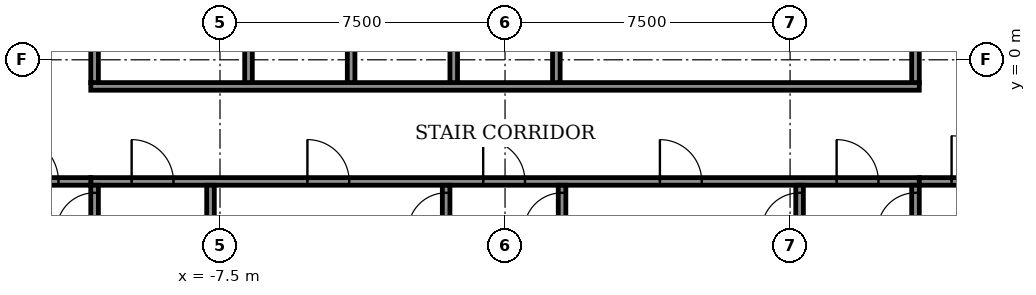
"""IFC4 building model, lengths in metres.
Left out: names, types, materials, properties, quantities, classifications, styles, units other than length and angle.
Written with IfcOpenShell. Run it as: python <this file> out.ifc"""

import sys

from ifc_helpers import new_model, si_unit, direction, frame, frame_2d, origin, place, context, subcontext, project, spatial, rectangle, extrude, element, fill, save


model = new_model("IFC4")
c1 = context("Model", 3, precision=1e-05, world=origin(), true_north=direction((0.0, 1.0)))
c2 = subcontext(c1, "Body", "Model", "MODEL_VIEW")
j1 = project(units=[si_unit("LENGTHUNIT", "METRE"), si_unit("PLANEANGLEUNIT", "RADIAN")], contexts=[c1])
p1 = place(None, origin())
s1 = spatial("IfcSite", under=j1, at=p1, CompositionType="ELEMENT")
p2 = place(p1, origin())
s2 = spatial("IfcBuilding", under=s1, at=p2, CompositionType="ELEMENT")
p3 = place(p2, frame((0.0, 0.0, 324.1)))
s3 = spatial("IfcBuildingStorey", under=s2, at=p3, CompositionType="ELEMENT", Elevation=324.1)
p4 = place(p3, frame((-10.9, -3.2, 0.0), z_axis=(0.0, 0.0, 1.0), x_axis=(1.0, 0.0, 0.0)))
e1 = element("IfcWall", 1, at=p4, inside=s3, PredefinedType="SHEAR", context=c2, shape_type="SweptSolid", body=[
    extrude(rectangle(XDim=21.8, YDim=0.2, at=frame_2d((10.9, 0.0))), origin(), (0.0, 0.0, 1.0), 5.05),
])
p5 = place(p4, frame((1.075, 0.0, 0.0)))
e2 = element("IfcOpeningElement", 2, at=p5, cuts=e1, PredefinedType="OPENING", context=c2, shape_type="SweptSolid", body=[
    extrude(rectangle(XDim=1.1, YDim=2.1, at=frame_2d((0.55, 1.05))), frame((0.0, 0.11, 0.0), z_axis=(0.0, -1.0, 0.0), x_axis=(1.0, 0.0, 0.0)), (0.0, 0.0, 1.0), 0.22),
])
p6 = place(p4, frame((10.325, 0.0, 0.0)))
e3 = element("IfcOpeningElement", 3, at=p6, cuts=e1, PredefinedType="OPENING", context=c2, shape_type="SweptSolid", body=[
    extrude(rectangle(XDim=1.1, YDim=2.1, at=frame_2d((0.55, 1.05))), frame((0.0, 0.11, 0.0), z_axis=(0.0, -1.0, 0.0), x_axis=(1.0, 0.0, 0.0)), (0.0, 0.0, 1.0), 0.22),
])
p7 = place(p4, frame((19.625, 0.0, 0.0)))
e4 = element("IfcOpeningElement", 4, at=p7, cuts=e1, PredefinedType="OPENING", context=c2, shape_type="SweptSolid", body=[
    extrude(rectangle(XDim=1.1, YDim=2.1, at=frame_2d((0.55, 1.05))), frame((0.0, 0.11, 0.0), z_axis=(0.0, -1.0, 0.0), x_axis=(1.0, 0.0, 0.0)), (0.0, 0.0, 1.0), 0.22),
])
p8 = place(p4, frame((5.7, 0.0, 0.0)))
e5 = element("IfcOpeningElement", 5, at=p8, cuts=e1, PredefinedType="OPENING", context=c2, shape_type="SweptSolid", body=[
    extrude(rectangle(XDim=1.1, YDim=2.1, at=frame_2d((0.55, 1.05))), frame((0.0, 0.11, 0.0), z_axis=(0.0, -1.0, 0.0), x_axis=(1.0, 0.0, 0.0)), (0.0, 0.0, 1.0), 0.22),
])
p9 = place(p4, frame((14.975, 0.0, 0.0)))
e6 = element("IfcOpeningElement", 6, at=p9, cuts=e1, PredefinedType="OPENING", context=c2, shape_type="SweptSolid", body=[
    extrude(rectangle(XDim=1.1, YDim=2.1, at=frame_2d((0.55, 1.05))), frame((0.0, 0.11, 0.0), z_axis=(0.0, -1.0, 0.0), x_axis=(1.0, 0.0, 0.0)), (0.0, 0.0, 1.0), 0.22),
])
p10 = place(p3, frame((-10.9, -0.7, 0.0), z_axis=(0.0, 0.0, 1.0), x_axis=(1.0, 0.0, 0.0)))
e7 = element("IfcWall", 7, at=p10, inside=s3, PredefinedType="SHEAR", context=c2, shape_type="SweptSolid", body=[
    extrude(rectangle(XDim=21.8, YDim=0.2, at=frame_2d((10.9, 0.0))), origin(), (0.0, 0.0, 1.0), 5.05),
])
p11 = place(p3, frame((-10.8, -10.8, 0.0), z_axis=(0.0, 0.0, 1.0), x_axis=(0.0, 1.0, 0.0)))
e8 = element("IfcWall", 8, at=p11, inside=s3, PredefinedType="SHEAR", context=c2, shape_type="SweptSolid", body=[
    extrude(rectangle(XDim=7.5, YDim=0.2, at=frame_2d((3.75, 0.0))), origin(), (0.0, 0.0, 1.0), 5.05),
])
p12 = place(p11, frame((6.3, 0.0, 0.0)))
e9 = element("IfcOpeningElement", 9, at=p12, cuts=e8, PredefinedType="OPENING", context=c2, shape_type="SweptSolid", body=[
    extrude(rectangle(XDim=1.0, YDim=2.1, at=frame_2d((0.5, 1.05))), frame((0.0, 0.11, 0.0), z_axis=(0.0, -1.0, 0.0), x_axis=(1.0, 0.0, 0.0)), (0.0, 0.0, 1.0), 0.22),
])
p13 = place(p3, frame((-7.75, -10.8, 0.0), z_axis=(0.0, 0.0, 1.0), x_axis=(0.0, 1.0, 0.0)))
e10 = element("IfcWall", 10, at=p13, inside=s3, PredefinedType="SHEAR", context=c2, shape_type="SweptSolid", body=[
    extrude(rectangle(XDim=7.5, YDim=0.2, at=frame_2d((3.75, 0.0))), origin(), (0.0, 0.0, 1.0), 5.05),
])
p14 = place(p3, frame((-1.55, -10.8, 0.0), z_axis=(0.0, 0.0, 1.0), x_axis=(0.0, 1.0, 0.0)))
e11 = element("IfcWall", 11, at=p14, inside=s3, PredefinedType="SHEAR", context=c2, shape_type="SweptSolid", body=[
    extrude(rectangle(XDim=7.5, YDim=0.2, at=frame_2d((3.75, 0.0))), origin(), (0.0, 0.0, 1.0), 5.05),
])
p15 = place(p14, frame((6.3, 0.0, 0.0)))
e12 = element("IfcOpeningElement", 12, at=p15, cuts=e11, PredefinedType="OPENING", context=c2, shape_type="SweptSolid", body=[
    extrude(rectangle(XDim=1.0, YDim=2.1, at=frame_2d((0.5, 1.05))), frame((0.0, 0.11, 0.0), z_axis=(0.0, -1.0, 0.0), x_axis=(1.0, 0.0, 0.0)), (0.0, 0.0, 1.0), 0.22),
])
p16 = place(p3, frame((1.5, -10.8, 0.0), z_axis=(0.0, 0.0, 1.0), x_axis=(0.0, 1.0, 0.0)))
e13 = element("IfcWall", 13, at=p16, inside=s3, PredefinedType="SHEAR", context=c2, shape_type="SweptSolid", body=[
    extrude(rectangle(XDim=7.5, YDim=0.2, at=frame_2d((3.75, 0.0))), origin(), (0.0, 0.0, 1.0), 5.05),
])
p17 = place(p16, frame((6.3, 0.0, 0.0)))
e14 = element("IfcOpeningElement", 14, at=p17, cuts=e13, PredefinedType="OPENING", context=c2, shape_type="SweptSolid", body=[
    extrude(rectangle(XDim=1.0, YDim=2.1, at=frame_2d((0.5, 1.05))), frame((0.0, 0.11, 0.0), z_axis=(0.0, -1.0, 0.0), x_axis=(1.0, 0.0, 0.0)), (0.0, 0.0, 1.0), 0.22),
])
p18 = place(p3, frame((7.75, -10.8, 0.0), z_axis=(0.0, 0.0, 1.0), x_axis=(0.0, 1.0, 0.0)))
e15 = element("IfcWall", 15, at=p18, inside=s3, PredefinedType="SHEAR", context=c2, shape_type="SweptSolid", body=[
    extrude(rectangle(XDim=7.5, YDim=0.2, at=frame_2d((3.75, 0.0))), origin(), (0.0, 0.0, 1.0), 5.05),
])
p19 = place(p18, frame((6.3, 0.0, 0.0)))
e16 = element("IfcOpeningElement", 16, at=p19, cuts=e15, PredefinedType="OPENING", context=c2, shape_type="SweptSolid", body=[
    extrude(rectangle(XDim=1.0, YDim=2.1, at=frame_2d((0.5, 1.05))), frame((0.0, 0.11, 0.0), z_axis=(0.0, -1.0, 0.0), x_axis=(1.0, 0.0, 0.0)), (0.0, 0.0, 1.0), 0.22),
])
p20 = place(p3, frame((10.8, -10.8, 0.0), z_axis=(0.0, 0.0, 1.0), x_axis=(0.0, 1.0, 0.0)))
e17 = element("IfcWall", 17, at=p20, inside=s3, PredefinedType="SHEAR", context=c2, shape_type="SweptSolid", body=[
    extrude(rectangle(XDim=7.5, YDim=0.2, at=frame_2d((3.75, 0.0))), origin(), (0.0, 0.0, 1.0), 5.05),
])
p21 = place(p20, frame((6.3, 0.0, 0.0)))
e18 = element("IfcOpeningElement", 18, at=p21, cuts=e17, PredefinedType="OPENING", context=c2, shape_type="SweptSolid", body=[
    extrude(rectangle(XDim=1.0, YDim=2.1, at=frame_2d((0.5, 1.05))), frame((0.0, 0.11, 0.0), z_axis=(0.0, -1.0, 0.0), x_axis=(1.0, 0.0, 0.0)), (0.0, 0.0, 1.0), 0.22),
])
p22 = place(p3, frame((-10.8, -0.6, 0.0), z_axis=(0.0, 0.0, 1.0), x_axis=(0.0, 1.0, 0.0)))
e19 = element("IfcWall", 19, at=p22, inside=s3, PredefinedType="STANDARD", context=c2, shape_type="SweptSolid", body=[
    extrude(rectangle(XDim=2.5, YDim=0.2, at=frame_2d((1.25, 0.0))), origin(), (0.0, 0.0, 1.0), 5.05),
])
for number, where, z_axis, x_axis in (
    (20, (-6.75, -0.6, 0.0), (0.0, 0.0, 1.0), (0.0, 1.0, 0.0)),
    (21, (-4.05, -0.6, 0.0), (0.0, 0.0, 1.0), (0.0, 1.0, 0.0)),
    (22, (-1.35, -0.6, 0.0), (0.0, 0.0, 1.0), (0.0, 1.0, 0.0)),
    (23, (1.35, -0.6, 0.0), (0.0, 0.0, 1.0), (0.0, 1.0, 0.0)),
):
    element("IfcWall", number, at=place(p3, frame(where, z_axis=z_axis, x_axis=x_axis)), inside=s3, PredefinedType="SHEAR", context=c2, shape_type="SweptSolid", body=[
        extrude(rectangle(XDim=2.5, YDim=0.2, at=frame_2d((1.25, 0.0))), origin(), (0.0, 0.0, 1.0), 5.05),
    ])
p23 = place(p3, frame((10.8, -0.6, 0.0), z_axis=(0.0, 0.0, 1.0), x_axis=(0.0, 1.0, 0.0)))
e24 = element("IfcWall", 24, at=p23, inside=s3, PredefinedType="STANDARD", context=c2, shape_type="SweptSolid", body=[
    extrude(rectangle(XDim=2.5, YDim=0.2, at=frame_2d((1.25, 0.0))), origin(), (0.0, 0.0, 1.0), 5.05),
])
p24 = place(p3, frame((-13.8, -3.2, 0.0), z_axis=(0.0, 0.0, 1.0), x_axis=(1.0, 0.0, 0.0)))
e25 = element("IfcWall", 25, at=p24, inside=s3, PredefinedType="STANDARD", context=c2, shape_type="SweptSolid", body=[
    extrude(rectangle(XDim=2.9, YDim=0.2, at=frame_2d((1.45, 0.0))), origin(), (0.0, 0.0, 1.0), 5.05),
])
p25 = place(p24, frame((0.85, 0.0, 0.0)))
e26 = element("IfcOpeningElement", 26, at=p25, cuts=e25, PredefinedType="OPENING", context=c2, shape_type="SweptSolid", body=[
    extrude(rectangle(XDim=1.2, YDim=2.1, at=frame_2d((0.6, 1.05))), frame((0.0, 0.11, 0.0), z_axis=(0.0, -1.0, 0.0), x_axis=(1.0, 0.0, 0.0)), (0.0, 0.0, 1.0), 0.22),
])
p26 = place(p3, frame((10.9, -3.2, 0.0), z_axis=(0.0, 0.0, 1.0), x_axis=(1.0, 0.0, 0.0)))
e27 = element("IfcWall", 27, at=p26, inside=s3, PredefinedType="STANDARD", context=c2, shape_type="SweptSolid", body=[
    extrude(rectangle(XDim=2.9, YDim=0.2, at=frame_2d((1.45, 0.0))), origin(), (0.0, 0.0, 1.0), 5.05),
])
p27 = place(p26, frame((0.85, 0.0, 0.0)))
e28 = element("IfcOpeningElement", 28, at=p27, cuts=e27, PredefinedType="OPENING", context=c2, shape_type="SweptSolid", body=[
    extrude(rectangle(XDim=1.2, YDim=2.1, at=frame_2d((0.6, 1.05))), frame((0.0, 0.11, 0.0), z_axis=(0.0, -1.0, 0.0), x_axis=(1.0, 0.0, 0.0)), (0.0, 0.0, 1.0), 0.22),
])
p28 = place(p5, origin())
e29 = element("IfcDoor", 29, at=p28, inside=s3, OperationType="SINGLE_SWING_RIGHT", PredefinedType="DOOR", context=c2, shape_type="SweptSolid", body=[
    extrude(rectangle(XDim=1.1, YDim=2.1, at=frame_2d((0.55, 1.05))), frame((0.0, 0.025, 0.0), z_axis=(0.0, -1.0, 0.0), x_axis=(1.0, 0.0, 0.0)), (0.0, 0.0, 1.0), 0.05),
])
fill(e2, e29)
p29 = place(p6, origin())
e30 = element("IfcDoor", 30, at=p29, inside=s3, OperationType="SINGLE_SWING_RIGHT", PredefinedType="DOOR", context=c2, shape_type="SweptSolid", body=[
    extrude(rectangle(XDim=1.1, YDim=2.1, at=frame_2d((0.55, 1.05))), frame((0.0, 0.025, 0.0), z_axis=(0.0, -1.0, 0.0), x_axis=(1.0, 0.0, 0.0)), (0.0, 0.0, 1.0), 0.05),
])
fill(e3, e30)
p30 = place(p7, origin())
e31 = element("IfcDoor", 31, at=p30, inside=s3, OperationType="SINGLE_SWING_RIGHT", PredefinedType="DOOR", context=c2, shape_type="SweptSolid", body=[
    extrude(rectangle(XDim=1.1, YDim=2.1, at=frame_2d((0.55, 1.05))), frame((0.0, 0.025, 0.0), z_axis=(0.0, -1.0, 0.0), x_axis=(1.0, 0.0, 0.0)), (0.0, 0.0, 1.0), 0.05),
])
fill(e4, e31)
p31 = place(p8, origin())
e32 = element("IfcDoor", 32, at=p31, inside=s3, OperationType="SINGLE_SWING_LEFT", PredefinedType="DOOR", context=c2, shape_type="SweptSolid", body=[
    extrude(rectangle(XDim=1.1, YDim=2.1, at=frame_2d((0.55, 1.05))), frame((0.0, 0.025, 0.0), z_axis=(0.0, -1.0, 0.0), x_axis=(1.0, 0.0, 0.0)), (0.0, 0.0, 1.0), 0.05),
])
fill(e5, e32)
p32 = place(p9, origin())
e33 = element("IfcDoor", 33, at=p32, inside=s3, OperationType="SINGLE_SWING_LEFT", PredefinedType="DOOR", context=c2, shape_type="SweptSolid", body=[
    extrude(rectangle(XDim=1.1, YDim=2.1, at=frame_2d((0.55, 1.05))), frame((0.0, 0.025, 0.0), z_axis=(0.0, -1.0, 0.0), x_axis=(1.0, 0.0, 0.0)), (0.0, 0.0, 1.0), 0.05),
])
fill(e6, e33)
p33 = place(p15, origin())
e34 = element("IfcDoor", 34, at=p33, inside=s3, OperationType="SINGLE_SWING_RIGHT", PredefinedType="DOOR", context=c2, shape_type="SweptSolid", body=[
    extrude(rectangle(XDim=1.0, YDim=2.1, at=frame_2d((0.5, 1.05))), frame((0.0, 0.025, 0.0), z_axis=(0.0, -1.0, 0.0), x_axis=(1.0, 0.0, 0.0)), (0.0, 0.0, 1.0), 0.05),
])
fill(e12, e34)
p34 = place(p17, origin())
e35 = element("IfcDoor", 35, at=p34, inside=s3, OperationType="SINGLE_SWING_RIGHT", PredefinedType="DOOR", context=c2, shape_type="SweptSolid", body=[
    extrude(rectangle(XDim=1.0, YDim=2.1, at=frame_2d((0.5, 1.05))), frame((0.0, 0.025, 0.0), z_axis=(0.0, -1.0, 0.0), x_axis=(1.0, 0.0, 0.0)), (0.0, 0.0, 1.0), 0.05),
])
fill(e14, e35)
p35 = place(p19, origin())
e36 = element("IfcDoor", 36, at=p35, inside=s3, OperationType="SINGLE_SWING_RIGHT", PredefinedType="DOOR", context=c2, shape_type="SweptSolid", body=[
    extrude(rectangle(XDim=1.0, YDim=2.1, at=frame_2d((0.5, 1.05))), frame((0.0, 0.025, 0.0), z_axis=(0.0, -1.0, 0.0), x_axis=(1.0, 0.0, 0.0)), (0.0, 0.0, 1.0), 0.05),
])
fill(e16, e36)
p36 = place(p25, origin())
e37 = element("IfcDoor", 37, at=p36, inside=s3, OperationType="SINGLE_SWING_LEFT", PredefinedType="DOOR", context=c2, shape_type="SweptSolid", body=[
    extrude(rectangle(XDim=1.2, YDim=2.1, at=frame_2d((0.6, 1.05))), frame((0.0, 0.025, 0.0), z_axis=(0.0, -1.0, 0.0), x_axis=(1.0, 0.0, 0.0)), (0.0, 0.0, 1.0), 0.05),
])
fill(e26, e37)
p37 = place(p12, origin())
e38 = element("IfcDoor", 38, at=p37, inside=s3, OperationType="SINGLE_SWING_RIGHT", PredefinedType="DOOR", context=c2, shape_type="SweptSolid", body=[
    extrude(rectangle(XDim=1.0, YDim=2.1, at=frame_2d((0.5, 1.05))), frame((0.0, 0.025, 0.0), z_axis=(0.0, -1.0, 0.0), x_axis=(1.0, 0.0, 0.0)), (0.0, 0.0, 1.0), 0.05),
])
fill(e9, e38)
p38 = place(p27, origin())
e39 = element("IfcDoor", 39, at=p38, inside=s3, OperationType="SINGLE_SWING_LEFT", PredefinedType="DOOR", context=c2, shape_type="SweptSolid", body=[
    extrude(rectangle(XDim=1.2, YDim=2.1, at=frame_2d((0.6, 1.05))), frame((0.0, 0.025, 0.0), z_axis=(0.0, -1.0, 0.0), x_axis=(1.0, 0.0, 0.0)), (0.0, 0.0, 1.0), 0.05),
])
fill(e28, e39)
p39 = place(p21, origin())
e40 = element("IfcDoor", 40, at=p39, inside=s3, OperationType="SINGLE_SWING_RIGHT", PredefinedType="DOOR", context=c2, shape_type="SweptSolid", body=[
    extrude(rectangle(XDim=1.0, YDim=2.1, at=frame_2d((0.5, 1.05))), frame((0.0, 0.025, 0.0), z_axis=(0.0, -1.0, 0.0), x_axis=(1.0, 0.0, 0.0)), (0.0, 0.0, 1.0), 0.05),
])
fill(e18, e40)
save(model, sys.argv[1])
